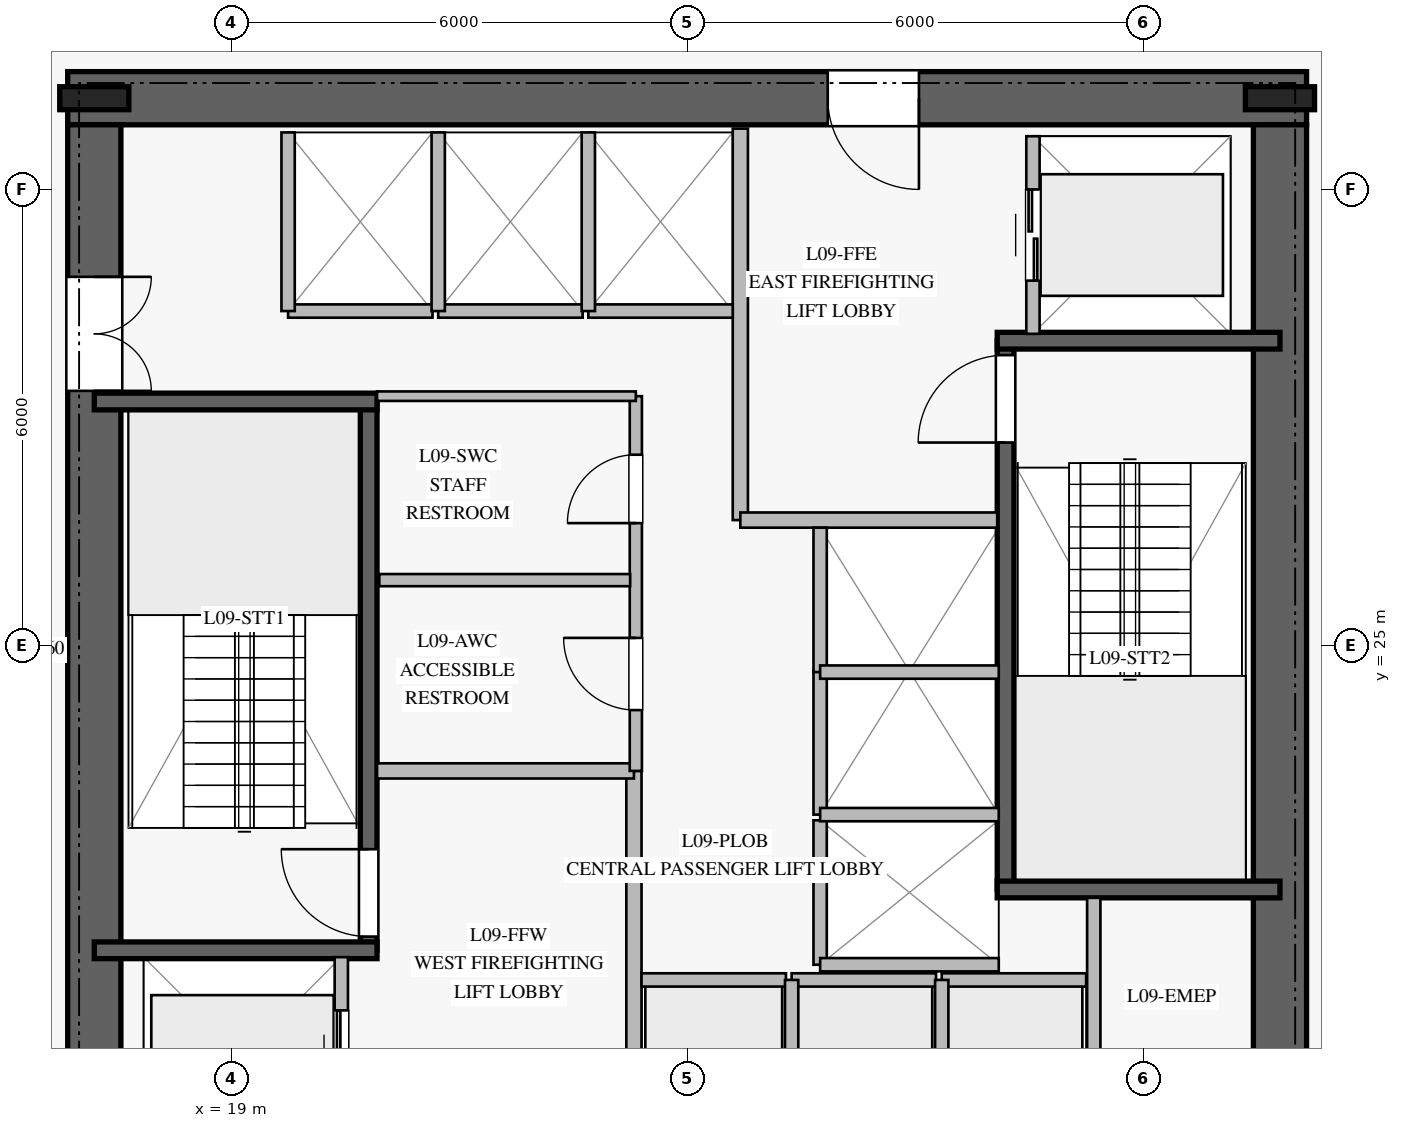
"""IFC4 building model, lengths in metres.
Left out: names, types, materials, properties, quantities, classifications, styles, units other than length and angle.
Written with IfcOpenShell. Run it as: python <this file> out.ifc"""

import sys

from ifc_helpers import new_model, si_unit, direction, frame, frame_2d, origin, origin_2d, place, context, subcontext, project, spatial, rectangle, i_section, extrude, element, fill, save


model = new_model("IFC4")
c1 = context("Model", 3, precision=1e-05, world=origin(), true_north=direction((0.0, 1.0)))
c2 = subcontext(c1, "Body", "Model", "MODEL_VIEW")
j1 = project(units=[si_unit("LENGTHUNIT", "METRE"), si_unit("PLANEANGLEUNIT", "RADIAN")], contexts=[c1])
p1 = place(None, origin())
s1 = spatial("IfcSite", under=j1, at=p1, CompositionType="ELEMENT")
p2 = place(p1, origin())
s2 = spatial("IfcBuilding", under=s1, at=p2, CompositionType="ELEMENT")
p3 = place(p2, frame((0.0, 0.0, 40.0)))
s3 = spatial("IfcBuildingStorey", under=s2, at=p3, CompositionType="ELEMENT", Elevation=40.0)
p4 = place(p3, frame((33.15, 32.2, 0.0), z_axis=(0.0, 0.0, 1.0), x_axis=(-1.0, 0.0, 0.0)))
e1 = element("IfcWall", 1, at=p4, inside=s3, PredefinedType="SHEAR", context=c2, shape_type="SweptSolid", body=[
    extrude(rectangle(XDim=16.3, YDim=0.7, at=frame_2d((8.15, 0.0))), origin(), (0.0, 0.0, 1.0), 3.76),
])
p5 = place(p4, frame((5.1, 0.0, 0.0)))
e2 = element("IfcOpeningElement", 2, at=p5, cuts=e1, PredefinedType="OPENING", context=c2, shape_type="SweptSolid", body=[
    extrude(rectangle(XDim=1.2, YDim=2.25, at=frame_2d((0.6, 1.125))), frame((0.0, 0.36, 0.0), z_axis=(0.0, -1.0, 0.0), x_axis=(1.0, 0.0, 0.0)), (0.0, 0.0, 1.0), 0.72),
])
p6 = place(p3, frame((17.2, 31.85, 0.0), z_axis=(0.0, 0.0, 1.0), x_axis=(0.0, -1.0, 0.0)))
e3 = element("IfcWall", 3, at=p6, inside=s3, PredefinedType="SHEAR", context=c2, shape_type="SweptSolid", body=[
    extrude(rectangle(XDim=13.7, YDim=0.7, at=frame_2d((6.85, 0.0))), origin(), (0.0, 0.0, 1.0), 3.76),
])
p7 = place(p6, frame((2.0, 0.0, 0.0)))
e4 = element("IfcOpeningElement", 4, at=p7, cuts=e3, PredefinedType="OPENING", context=c2, shape_type="SweptSolid", body=[
    extrude(rectangle(XDim=1.5, YDim=2.2, at=frame_2d((0.75, 1.1))), frame((0.0, 0.36, 0.0), z_axis=(0.0, -1.0, 0.0), x_axis=(1.0, 0.0, 0.0)), (0.0, 0.0, 1.0), 0.72),
])
p8 = place(p3, frame((32.8, 18.15, 0.0), z_axis=(0.0, 0.0, 1.0), x_axis=(0.0, 1.0, 0.0)))
e5 = element("IfcWall", 5, at=p8, inside=s3, PredefinedType="SHEAR", context=c2, shape_type="SweptSolid", body=[
    extrude(rectangle(XDim=13.7, YDim=0.7, at=frame_2d((6.85, 0.0))), origin(), (0.0, 0.0, 1.0), 3.76),
])
for number, where, z_axis, x_axis in (
    (6, (32.8, 32.2, 0.0), (0.0, 0.0, 1.0), (1.0, 0.0, 0.0)),
    (7, (17.2, 32.2, 0.0), (0.0, 0.0, 1.0), (1.0, 0.0, 0.0)),
):
    element("IfcColumn", number, at=place(p3, frame(where, z_axis=z_axis, x_axis=x_axis)), inside=s3, PredefinedType="COLUMN", context=c2, shape_type="SweptSolid", body=[
        extrude(i_section(OverallWidth=0.302, OverallDepth=0.91, WebThickness=0.021, FlangeThickness=0.04, at=origin_2d()), origin(), (0.0, 0.0, 1.0), 4.0),
    ])
p9 = place(p3, frame((20.81, 20.99, 0.0), z_axis=(0.0, 0.0, 1.0), x_axis=(0.0, 1.0, 0.0)))
e8 = element("IfcWall", 8, at=p9, inside=s3, PredefinedType="SOLIDWALL", context=c2, shape_type="SweptSolid", body=[
    extrude(rectangle(XDim=7.22, YDim=0.22, at=frame_2d((3.61, 0.0))), origin(), (0.0, 0.0, 1.0), 3.76),
])
p10 = place(p9, frame((0.18, 0.0, 0.0)))
e9 = element("IfcOpeningElement", 9, at=p10, cuts=e8, PredefinedType="OPENING", context=c2, shape_type="SweptSolid", body=[
    extrude(rectangle(XDim=1.15, YDim=2.2, at=frame_2d((0.575, 1.1))), frame((0.0, 0.12, 0.0), z_axis=(0.0, -1.0, 0.0), x_axis=(1.0, 0.0, 0.0)), (0.0, 0.0, 1.0), 0.24),
])
for number, where, z_axis, x_axis in (
    (10, (17.2, 20.99, 0.0), (0.0, 0.0, 1.0), (1.0, 0.0, 0.0)),
    (11, (17.2, 28.21, 0.0), (0.0, 0.0, 1.0), (1.0, 0.0, 0.0)),
):
    element("IfcWall", number, at=place(p3, frame(where, z_axis=z_axis, x_axis=x_axis)), inside=s3, PredefinedType="SOLIDWALL", context=c2, shape_type="SweptSolid", body=[
        extrude(rectangle(XDim=3.72, YDim=0.22, at=frame_2d((1.86, 0.0))), origin(), (0.0, 0.0, 1.0), 3.76),
    ])
p11 = place(p3, frame((29.19, 21.79, 0.0), z_axis=(0.0, 0.0, 1.0), x_axis=(0.0, 1.0, 0.0)))
e12 = element("IfcWall", 12, at=p11, inside=s3, PredefinedType="SOLIDWALL", context=c2, shape_type="SweptSolid", body=[
    extrude(rectangle(XDim=7.22, YDim=0.22, at=frame_2d((3.61, 0.0))), origin(), (0.0, 0.0, 1.0), 3.76),
])
p12 = place(p11, frame((5.88, 0.0, 0.0)))
e13 = element("IfcOpeningElement", 13, at=p12, cuts=e12, PredefinedType="OPENING", context=c2, shape_type="SweptSolid", body=[
    extrude(rectangle(XDim=1.15, YDim=2.2, at=frame_2d((0.575, 1.1))), frame((0.0, 0.12, 0.0), z_axis=(0.0, -1.0, 0.0), x_axis=(1.0, 0.0, 0.0)), (0.0, 0.0, 1.0), 0.24),
])
for number, where, z_axis, x_axis in (
    (14, (29.08, 21.79, 0.0), (0.0, 0.0, 1.0), (1.0, 0.0, 0.0)),
    (15, (29.08, 29.01, 0.0), (0.0, 0.0, 1.0), (1.0, 0.0, 0.0)),
):
    element("IfcWall", number, at=place(p3, frame(where, z_axis=z_axis, x_axis=x_axis)), inside=s3, PredefinedType="SOLIDWALL", context=c2, shape_type="SweptSolid", body=[
        extrude(rectangle(XDim=3.72, YDim=0.22, at=frame_2d((1.86, 0.0))), origin(), (0.0, 0.0, 1.0), 3.76),
    ])
p13 = place(p3, frame((24.3, 18.2, 0.0), z_axis=(0.0, 0.0, 1.0), x_axis=(0.0, 1.0, 0.0)))
e16 = element("IfcWall", 16, at=p13, inside=s3, PredefinedType="PARTITIONING", context=c2, shape_type="SweptSolid", body=[
    extrude(rectangle(XDim=5.15, YDim=0.2, at=frame_2d((2.575, 0.0))), origin(), (0.0, 0.0, 1.0), 3.76),
])
p14 = place(p3, frame((20.92, 23.35, 0.0), z_axis=(0.0, 0.0, 1.0), x_axis=(1.0, 0.0, 0.0)))
e17 = element("IfcWall", 17, at=p14, inside=s3, PredefinedType="PARTITIONING", context=c2, shape_type="SweptSolid", body=[
    extrude(rectangle(XDim=3.38, YDim=0.2, at=frame_2d((1.69, 0.0))), origin(), (0.0, 0.0, 1.0), 3.76),
])
p15 = place(p3, frame((25.7, 26.65, 0.0), z_axis=(0.0, 0.0, 1.0), x_axis=(0.0, 1.0, 0.0)))
e18 = element("IfcWall", 18, at=p15, inside=s3, PredefinedType="PARTITIONING", context=c2, shape_type="SweptSolid", body=[
    extrude(rectangle(XDim=5.15, YDim=0.2, at=frame_2d((2.575, 0.0))), origin(), (0.0, 0.0, 1.0), 3.76),
])
p16 = place(p3, frame((25.7, 26.65, 0.0), z_axis=(0.0, 0.0, 1.0), x_axis=(1.0, 0.0, 0.0)))
e19 = element("IfcWall", 19, at=p16, inside=s3, PredefinedType="PARTITIONING", context=c2, shape_type="SweptSolid", body=[
    extrude(rectangle(XDim=3.38, YDim=0.2, at=frame_2d((1.69, 0.0))), origin(), (0.0, 0.0, 1.0), 3.76),
])
p17 = place(p3, frame((24.325, 23.35, 0.0), z_axis=(0.0, 0.0, 1.0), x_axis=(0.0, 1.0, 0.0)))
e20 = element("IfcWall", 20, at=p17, inside=s3, PredefinedType="PLUMBINGWALL", context=c2, shape_type="SweptSolid", body=[
    extrude(rectangle(XDim=4.93, YDim=0.16, at=frame_2d((2.465, 0.0))), origin(), (0.0, 0.0, 1.0), 3.76),
])
p18 = place(p17, frame((0.8, 0.0, 0.0)))
e21 = element("IfcOpeningElement", 21, at=p18, cuts=e20, PredefinedType="OPENING", context=c2, shape_type="SweptSolid", body=[
    extrude(rectangle(XDim=0.95, YDim=2.1, at=frame_2d((0.475, 1.05))), frame((0.0, 0.09, 0.0), z_axis=(0.0, -1.0, 0.0), x_axis=(1.0, 0.0, 0.0)), (0.0, 0.0, 1.0), 0.18),
])
p19 = place(p17, frame((3.26, 0.0, 0.0)))
e22 = element("IfcOpeningElement", 22, at=p19, cuts=e20, PredefinedType="OPENING", context=c2, shape_type="SweptSolid", body=[
    extrude(rectangle(XDim=0.9, YDim=2.1, at=frame_2d((0.45, 1.05))), frame((0.0, 0.09, 0.0), z_axis=(0.0, -1.0, 0.0), x_axis=(1.0, 0.0, 0.0)), (0.0, 0.0, 1.0), 0.18),
])
p20 = place(p3, frame((20.92, 28.28, 0.0), z_axis=(0.0, 0.0, 1.0), x_axis=(1.0, 0.0, 0.0)))
e23 = element("IfcWall", 23, at=p20, inside=s3, PredefinedType="PARTITIONING", context=c2, shape_type="SweptSolid", body=[
    extrude(rectangle(XDim=3.405, YDim=0.125, at=frame_2d((1.703, 0.0))), origin(), (0.0, 0.0, 1.0), 3.76),
])
p21 = place(p3, frame((20.95, 25.86, 0.0), z_axis=(0.0, 0.0, 1.0), x_axis=(1.0, 0.0, 0.0)))
e24 = element("IfcWall", 24, at=p21, inside=s3, PredefinedType="PLUMBINGWALL", context=c2, shape_type="SweptSolid", body=[
    extrude(rectangle(XDim=3.3, YDim=0.16, at=frame_2d((1.65, 0.0))), origin(), (0.0, 0.0, 1.0), 3.76),
])
p22 = place(p3, frame((30.35, 18.2, 0.0), z_axis=(0.0, 0.0, 1.0), x_axis=(0.0, 1.0, 0.0)))
e25 = element("IfcWall", 25, at=p22, inside=s3, PredefinedType="PARTITIONING", context=c2, shape_type="SweptSolid", body=[
    extrude(rectangle(XDim=3.48, YDim=0.175, at=frame_2d((1.74, 0.0))), origin(), (0.0, 0.0, 1.0), 3.76),
])
p23 = place(p3, frame((24.4, 20.6, 0.0), z_axis=(0.0, 0.0, 1.0), x_axis=(1.0, 0.0, 0.0)))
e26 = element("IfcWall", 26, at=p23, inside=s3, PredefinedType="PARTITIONING", context=c2, shape_type="SweptSolid", body=[
    extrude(rectangle(XDim=1.9, YDim=0.175, at=frame_2d((0.95, 0.0))), origin(), (0.0, 0.0, 1.0), 3.76),
])
p24 = place(p3, frame((26.375, 20.6, 0.0), z_axis=(0.0, 0.0, 1.0), x_axis=(1.0, 0.0, 0.0)))
e27 = element("IfcWall", 27, at=p24, inside=s3, PredefinedType="PARTITIONING", context=c2, shape_type="SweptSolid", body=[
    extrude(rectangle(XDim=1.9, YDim=0.175, at=frame_2d((0.95, 0.0))), origin(), (0.0, 0.0, 1.0), 3.76),
])
p25 = place(p3, frame((26.375, 18.25, 0.0), z_axis=(0.0, 0.0, 1.0), x_axis=(0.0, 1.0, 0.0)))
e28 = element("IfcWall", 28, at=p25, inside=s3, PredefinedType="PARTITIONING", context=c2, shape_type="SweptSolid", body=[
    extrude(rectangle(XDim=2.35, YDim=0.175, at=frame_2d((1.175, 0.0))), origin(), (0.0, 0.0, 1.0), 3.76),
])
p26 = place(p3, frame((28.35, 20.6, 0.0), z_axis=(0.0, 0.0, 1.0), x_axis=(1.0, 0.0, 0.0)))
e29 = element("IfcWall", 29, at=p26, inside=s3, PredefinedType="PARTITIONING", context=c2, shape_type="SweptSolid", body=[
    extrude(rectangle(XDim=1.9, YDim=0.175, at=frame_2d((0.95, 0.0))), origin(), (0.0, 0.0, 1.0), 3.76),
])
p27 = place(p3, frame((28.35, 18.25, 0.0), z_axis=(0.0, 0.0, 1.0), x_axis=(0.0, 1.0, 0.0)))
e30 = element("IfcWall", 30, at=p27, inside=s3, PredefinedType="PARTITIONING", context=c2, shape_type="SweptSolid", body=[
    extrude(rectangle(XDim=2.35, YDim=0.175, at=frame_2d((1.175, 0.0))), origin(), (0.0, 0.0, 1.0), 3.76),
])
p28 = place(p3, frame((19.75, 29.4, 0.0), z_axis=(0.0, 0.0, 1.0), x_axis=(1.0, 0.0, 0.0)))
e31 = element("IfcWall", 31, at=p28, inside=s3, PredefinedType="PARTITIONING", context=c2, shape_type="SweptSolid", body=[
    extrude(rectangle(XDim=1.9, YDim=0.175, at=frame_2d((0.95, 0.0))), origin(), (0.0, 0.0, 1.0), 3.76),
])
p29 = place(p3, frame((19.75, 29.4, 0.0), z_axis=(0.0, 0.0, 1.0), x_axis=(0.0, 1.0, 0.0)))
e32 = element("IfcWall", 32, at=p29, inside=s3, PredefinedType="PARTITIONING", context=c2, shape_type="SweptSolid", body=[
    extrude(rectangle(XDim=2.35, YDim=0.175, at=frame_2d((1.175, 0.0))), origin(), (0.0, 0.0, 1.0), 3.76),
])
p30 = place(p3, frame((21.725, 29.4, 0.0), z_axis=(0.0, 0.0, 1.0), x_axis=(1.0, 0.0, 0.0)))
e33 = element("IfcWall", 33, at=p30, inside=s3, PredefinedType="PARTITIONING", context=c2, shape_type="SweptSolid", body=[
    extrude(rectangle(XDim=1.9, YDim=0.175, at=frame_2d((0.95, 0.0))), origin(), (0.0, 0.0, 1.0), 3.76),
])
p31 = place(p3, frame((21.725, 29.4, 0.0), z_axis=(0.0, 0.0, 1.0), x_axis=(0.0, 1.0, 0.0)))
e34 = element("IfcWall", 34, at=p31, inside=s3, PredefinedType="PARTITIONING", context=c2, shape_type="SweptSolid", body=[
    extrude(rectangle(XDim=2.35, YDim=0.175, at=frame_2d((1.175, 0.0))), origin(), (0.0, 0.0, 1.0), 3.76),
])
p32 = place(p3, frame((23.7, 29.4, 0.0), z_axis=(0.0, 0.0, 1.0), x_axis=(1.0, 0.0, 0.0)))
e35 = element("IfcWall", 35, at=p32, inside=s3, PredefinedType="PARTITIONING", context=c2, shape_type="SweptSolid", body=[
    extrude(rectangle(XDim=1.9, YDim=0.175, at=frame_2d((0.95, 0.0))), origin(), (0.0, 0.0, 1.0), 3.76),
])
p33 = place(p3, frame((23.7, 29.4, 0.0), z_axis=(0.0, 0.0, 1.0), x_axis=(0.0, 1.0, 0.0)))
e36 = element("IfcWall", 36, at=p33, inside=s3, PredefinedType="PARTITIONING", context=c2, shape_type="SweptSolid", body=[
    extrude(rectangle(XDim=2.35, YDim=0.175, at=frame_2d((1.175, 0.0))), origin(), (0.0, 0.0, 1.0), 3.76),
])
p34 = place(p3, frame((26.75, 20.8, 0.0), z_axis=(0.0, 0.0, 1.0), x_axis=(0.0, 1.0, 0.0)))
e37 = element("IfcWall", 37, at=p34, inside=s3, PredefinedType="PARTITIONING", context=c2, shape_type="SweptSolid", body=[
    extrude(rectangle(XDim=1.9, YDim=0.175, at=frame_2d((0.95, 0.0))), origin(), (0.0, 0.0, 1.0), 3.76),
])
p35 = place(p3, frame((26.75, 20.8, 0.0), z_axis=(0.0, 0.0, 1.0), x_axis=(1.0, 0.0, 0.0)))
e38 = element("IfcWall", 38, at=p35, inside=s3, PredefinedType="PARTITIONING", context=c2, shape_type="SweptSolid", body=[
    extrude(rectangle(XDim=2.35, YDim=0.175, at=frame_2d((1.175, 0.0))), origin(), (0.0, 0.0, 1.0), 3.76),
])
p36 = place(p3, frame((26.75, 22.775, 0.0), z_axis=(0.0, 0.0, 1.0), x_axis=(0.0, 1.0, 0.0)))
e39 = element("IfcWall", 39, at=p36, inside=s3, PredefinedType="PARTITIONING", context=c2, shape_type="SweptSolid", body=[
    extrude(rectangle(XDim=1.9, YDim=0.175, at=frame_2d((0.95, 0.0))), origin(), (0.0, 0.0, 1.0), 3.76),
])
p37 = place(p3, frame((26.75, 22.775, 0.0), z_axis=(0.0, 0.0, 1.0), x_axis=(1.0, 0.0, 0.0)))
e40 = element("IfcWall", 40, at=p37, inside=s3, PredefinedType="PARTITIONING", context=c2, shape_type="SweptSolid", body=[
    extrude(rectangle(XDim=2.35, YDim=0.175, at=frame_2d((1.175, 0.0))), origin(), (0.0, 0.0, 1.0), 3.76),
])
p38 = place(p3, frame((26.75, 24.65, 0.0), z_axis=(0.0, 0.0, 1.0), x_axis=(0.0, 1.0, 0.0)))
e41 = element("IfcWall", 41, at=p38, inside=s3, PredefinedType="PARTITIONING", context=c2, shape_type="SweptSolid", body=[
    extrude(rectangle(XDim=1.9, YDim=0.175, at=frame_2d((0.95, 0.0))), origin(), (0.0, 0.0, 1.0), 3.76),
])
p39 = place(p3, frame((26.75, 24.65, 0.0), z_axis=(0.0, 0.0, 1.0), x_axis=(1.0, 0.0, 0.0)))
e42 = element("IfcWall", 42, at=p39, inside=s3, PredefinedType="PARTITIONING", context=c2, shape_type="SweptSolid", body=[
    extrude(rectangle(XDim=2.35, YDim=0.175, at=frame_2d((1.175, 0.0))), origin(), (0.0, 0.0, 1.0), 3.76),
])
p40 = place(p3, frame((20.45, 18.3, 0.0), z_axis=(0.0, 0.0, 1.0), x_axis=(0.0, 1.0, 0.0)))
e43 = element("IfcWall", 43, at=p40, inside=s3, PredefinedType="PARTITIONING", context=c2, shape_type="SweptSolid", body=[
    extrude(rectangle(XDim=2.6, YDim=0.175, at=frame_2d((1.3, 0.0))), origin(), (0.0, 0.0, 1.0), 3.76),
])
p41 = place(p40, frame((0.7, 0.0, 0.0)))
e44 = element("IfcOpeningElement", 44, at=p41, cuts=e43, PredefinedType="OPENING", context=c2, shape_type="SweptSolid", body=[
    extrude(rectangle(XDim=1.2, YDim=2.2, at=frame_2d((0.6, 1.1))), frame((0.0, 0.098, 0.0), z_axis=(0.0, -1.0, 0.0), x_axis=(1.0, 0.0, 0.0)), (0.0, 0.0, 1.0), 0.195),
])
p42 = place(p3, frame((29.55, 29.1, 0.0), z_axis=(0.0, 0.0, 1.0), x_axis=(0.0, 1.0, 0.0)))
e45 = element("IfcWall", 45, at=p42, inside=s3, PredefinedType="PARTITIONING", context=c2, shape_type="SweptSolid", body=[
    extrude(rectangle(XDim=2.6, YDim=0.175, at=frame_2d((1.3, 0.0))), origin(), (0.0, 0.0, 1.0), 3.76),
])
p43 = place(p42, frame((0.7, 0.0, 0.0)))
e46 = element("IfcOpeningElement", 46, at=p43, cuts=e45, PredefinedType="OPENING", context=c2, shape_type="SweptSolid", body=[
    extrude(rectangle(XDim=1.2, YDim=2.2, at=frame_2d((0.6, 1.1))), frame((0.0, 0.098, 0.0), z_axis=(0.0, -1.0, 0.0), x_axis=(1.0, 0.0, 0.0)), (0.0, 0.0, 1.0), 0.195),
])
p44 = place(p10, origin())
e47 = element("IfcDoor", 47, at=p44, inside=s3, OperationType="SINGLE_SWING_RIGHT", PredefinedType="DOOR", context=c2, shape_type="SweptSolid", body=[
    extrude(rectangle(XDim=1.15, YDim=2.2, at=frame_2d((0.575, 1.1))), frame((0.0, 0.025, 0.0), z_axis=(0.0, -1.0, 0.0), x_axis=(1.0, 0.0, 0.0)), (0.0, 0.0, 1.0), 0.05),
])
fill(e9, e47)
p45 = place(p12, origin())
e48 = element("IfcDoor", 48, at=p45, inside=s3, OperationType="SINGLE_SWING_LEFT", PredefinedType="DOOR", context=c2, shape_type="SweptSolid", body=[
    extrude(rectangle(XDim=1.15, YDim=2.2, at=frame_2d((0.575, 1.1))), frame((0.0, 0.025, 0.0), z_axis=(0.0, -1.0, 0.0), x_axis=(1.0, 0.0, 0.0)), (0.0, 0.0, 1.0), 0.05),
])
fill(e13, e48)
p46 = place(p5, origin())
e49 = element("IfcDoor", 49, at=p46, inside=s3, OperationType="SINGLE_SWING_LEFT", PredefinedType="DOOR", context=c2, shape_type="SweptSolid", body=[
    extrude(rectangle(XDim=1.2, YDim=2.25, at=frame_2d((0.6, 1.125))), frame((0.0, 0.025, 0.0), z_axis=(0.0, -1.0, 0.0), x_axis=(1.0, 0.0, 0.0)), (0.0, 0.0, 1.0), 0.05),
])
fill(e2, e49)
p47 = place(p7, origin())
e50 = element("IfcDoor", 50, at=p47, inside=s3, OperationType="DOUBLE_DOOR_SINGLE_SWING", PredefinedType="DOOR", context=c2, shape_type="SweptSolid", body=[
    extrude(rectangle(XDim=1.5, YDim=2.2, at=frame_2d((0.75, 1.1))), frame((0.0, 0.025, 0.0), z_axis=(0.0, -1.0, 0.0), x_axis=(1.0, 0.0, 0.0)), (0.0, 0.0, 1.0), 0.05),
])
fill(e4, e50)
p48 = place(p18, origin())
e51 = element("IfcDoor", 51, at=p48, inside=s3, OperationType="SINGLE_SWING_RIGHT", PredefinedType="DOOR", context=c2, shape_type="SweptSolid", body=[
    extrude(rectangle(XDim=0.95, YDim=2.1, at=frame_2d((0.475, 1.05))), frame((0.0, 0.025, 0.0), z_axis=(0.0, -1.0, 0.0), x_axis=(1.0, 0.0, 0.0)), (0.0, 0.0, 1.0), 0.05),
])
fill(e21, e51)
p49 = place(p19, origin())
e52 = element("IfcDoor", 52, at=p49, inside=s3, OperationType="SINGLE_SWING_LEFT", PredefinedType="DOOR", context=c2, shape_type="SweptSolid", body=[
    extrude(rectangle(XDim=0.9, YDim=2.1, at=frame_2d((0.45, 1.05))), frame((0.0, 0.025, 0.0), z_axis=(0.0, -1.0, 0.0), x_axis=(1.0, 0.0, 0.0)), (0.0, 0.0, 1.0), 0.05),
])
fill(e22, e52)
p50 = place(p41, origin())
e53 = element("IfcDoor", 53, at=p50, inside=s3, OperationType="DOUBLE_DOOR_SLIDING", PredefinedType="DOOR", context=c2, shape_type="SweptSolid", body=[
    extrude(rectangle(XDim=1.2, YDim=2.2, at=frame_2d((0.6, 1.1))), frame((0.0, 0.025, 0.0), z_axis=(0.0, -1.0, 0.0), x_axis=(1.0, 0.0, 0.0)), (0.0, 0.0, 1.0), 0.05),
])
fill(e44, e53)
p51 = place(p43, origin())
e54 = element("IfcDoor", 54, at=p51, inside=s3, OperationType="DOUBLE_DOOR_SLIDING", PredefinedType="DOOR", context=c2, shape_type="SweptSolid", body=[
    extrude(rectangle(XDim=1.2, YDim=2.2, at=frame_2d((0.6, 1.1))), frame((0.0, 0.025, 0.0), z_axis=(0.0, -1.0, 0.0), x_axis=(1.0, 0.0, 0.0)), (0.0, 0.0, 1.0), 0.05),
])
fill(e46, e54)
save(model, sys.argv[1])
